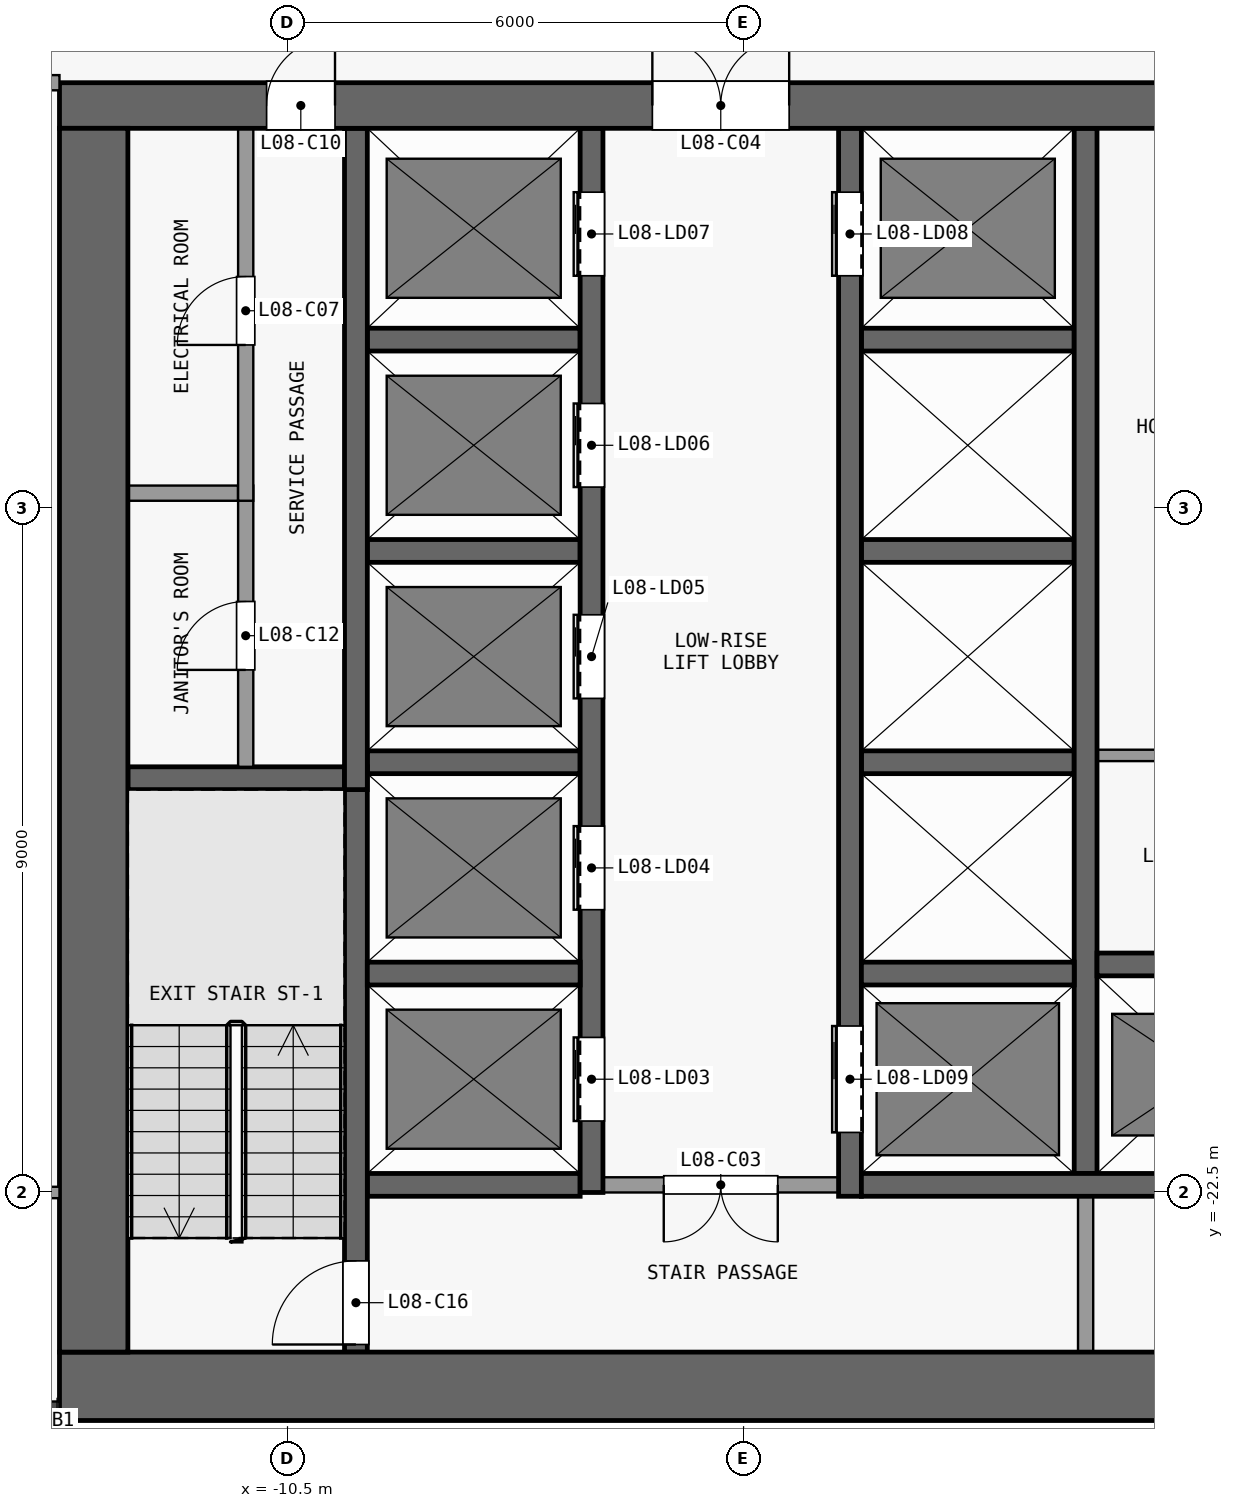
"""IFC4 building model, lengths in metres.
Left out: names, types, materials, properties, quantities, classifications, styles, units other than length and angle.
Written with IfcOpenShell. Run it as: python <this file> out.ifc"""

import sys

from ifc_helpers import new_model, si_unit, direction, frame, frame_2d, origin, place, context, subcontext, project, spatial, rectangle, extrude, element, fill, save


model = new_model("IFC4")
c1 = context("Model", 3, precision=1e-05, world=origin(), true_north=direction((0.0, 1.0)))
c2 = subcontext(c1, "Body", "Model", "MODEL_VIEW")
j1 = project(units=[si_unit("LENGTHUNIT", "METRE"), si_unit("PLANEANGLEUNIT", "RADIAN")], contexts=[c1])
p1 = place(None, origin())
s1 = spatial("IfcSite", under=j1, at=p1, CompositionType="ELEMENT")
p2 = place(p1, origin())
s2 = spatial("IfcBuilding", under=s1, at=p2, CompositionType="ELEMENT")
p3 = place(p2, frame((0.0, 0.0, 39.7)))
s3 = spatial("IfcBuildingStorey", under=s2, at=p3, CompositionType="ELEMENT", Elevation=39.7)
p4 = place(p3, frame((-13.5, -25.05, 0.0), z_axis=(0.0, 0.0, 1.0), x_axis=(1.0, 0.0, 0.0)))
e1 = element("IfcWall", 1, at=p4, inside=s3, PredefinedType="SHEAR", context=c2, shape_type="SweptSolid", body=[
    extrude(rectangle(XDim=27.0, YDim=0.9, at=frame_2d((13.5, 0.0))), origin(), (0.0, 0.0, 1.0), 3.3),
])
p5 = place(p3, frame((-13.5, -8.2, 0.0), z_axis=(0.0, 0.0, 1.0), x_axis=(1.0, 0.0, 0.0)))
e2 = element("IfcWall", 2, at=p5, inside=s3, PredefinedType="SHEAR", context=c2, shape_type="SweptSolid", body=[
    extrude(rectangle(XDim=27.0, YDim=0.6, at=frame_2d((13.5, 0.0))), origin(), (0.0, 0.0, 1.0), 3.3),
])
p6 = place(p5, frame((7.8, 0.0, 0.0)))
e3 = element("IfcOpeningElement", 3, at=p6, cuts=e2, PredefinedType="OPENING", context=c2, shape_type="SweptSolid", body=[
    extrude(rectangle(XDim=1.8, YDim=2.1, at=frame_2d((0.9, 1.05))), frame((0.0, 0.31, 0.0), z_axis=(0.0, -1.0, 0.0), x_axis=(1.0, 0.0, 0.0)), (0.0, 0.0, 1.0), 0.62),
])
p7 = place(p5, frame((17.4, 0.0, 0.0)))
e4 = element("IfcOpeningElement", 4, at=p7, cuts=e2, PredefinedType="OPENING", context=c2, shape_type="SweptSolid", body=[
    extrude(rectangle(XDim=1.8, YDim=2.1, at=frame_2d((0.9, 1.05))), frame((0.0, 0.31, 0.0), z_axis=(0.0, -1.0, 0.0), x_axis=(1.0, 0.0, 0.0)), (0.0, 0.0, 1.0), 0.62),
])
p8 = place(p5, frame((2.725, 0.0, 0.0)))
e5 = element("IfcOpeningElement", 5, at=p8, cuts=e2, PredefinedType="OPENING", context=c2, shape_type="SweptSolid", body=[
    extrude(rectangle(XDim=0.9, YDim=2.1, at=frame_2d((0.45, 1.05))), frame((0.0, 0.31, 0.0), z_axis=(0.0, -1.0, 0.0), x_axis=(1.0, 0.0, 0.0)), (0.0, 0.0, 1.0), 0.62),
])
p9 = place(p5, frame((23.375, 0.0, 0.0)))
e6 = element("IfcOpeningElement", 6, at=p9, cuts=e2, PredefinedType="OPENING", context=c2, shape_type="SweptSolid", body=[
    extrude(rectangle(XDim=0.9, YDim=2.1, at=frame_2d((0.45, 1.05))), frame((0.0, 0.31, 0.0), z_axis=(0.0, -1.0, 0.0), x_axis=(1.0, 0.0, 0.0)), (0.0, 0.0, 1.0), 0.62),
])
p10 = place(p3, frame((-13.05, -24.6, 0.0), z_axis=(0.0, 0.0, 1.0), x_axis=(0.0, 1.0, 0.0)))
e7 = element("IfcWall", 7, at=p10, inside=s3, PredefinedType="SHEAR", context=c2, shape_type="SweptSolid", body=[
    extrude(rectangle(XDim=16.1, YDim=0.9, at=frame_2d((8.05, 0.0))), origin(), (0.0, 0.0, 1.0), 3.3),
])
p11 = place(p3, frame((-9.45, -22.4, 0.0), z_axis=(0.0, 0.0, 1.0), x_axis=(1.0, 0.0, 0.0)))
e8 = element("IfcWall", 8, at=p11, inside=s3, PredefinedType="SHEAR", context=c2, shape_type="SweptSolid", body=[
    extrude(rectangle(XDim=2.8, YDim=0.3, at=frame_2d((1.4, 0.0))), origin(), (0.0, 0.0, 1.0), 3.3),
])
p12 = place(p3, frame((-3.25, -22.4, 0.0), z_axis=(0.0, 0.0, 1.0), x_axis=(-1.0, 0.0, 0.0)))
e9 = element("IfcWall", 9, at=p12, inside=s3, PredefinedType="PARTITIONING", context=c2, shape_type="SweptSolid", body=[
    extrude(rectangle(XDim=3.1, YDim=0.2, at=frame_2d((1.55, 0.0))), origin(), (0.0, 0.0, 1.0), 3.3),
])
p13 = place(p12, frame((0.8, 0.0, 0.0)))
e10 = element("IfcOpeningElement", 10, at=p13, cuts=e9, PredefinedType="OPENING", context=c2, shape_type="SweptSolid", body=[
    extrude(rectangle(XDim=1.5, YDim=2.1, at=frame_2d((0.75, 1.05))), frame((0.0, 0.11, 0.0), z_axis=(0.0, -1.0, 0.0), x_axis=(1.0, 0.0, 0.0)), (0.0, 0.0, 1.0), 0.22),
])
p14 = place(p3, frame((-2.95, -22.4, 0.0), z_axis=(0.0, 0.0, 1.0), x_axis=(1.0, 0.0, 0.0)))
e11 = element("IfcWall", 11, at=p14, inside=s3, PredefinedType="SHEAR", context=c2, shape_type="SweptSolid", body=[
    extrude(rectangle(XDim=6.2, YDim=0.3, at=frame_2d((3.1, 0.0))), origin(), (0.0, 0.0, 1.0), 3.3),
])
for number, where, z_axis, x_axis in (
    (12, (-9.45, -19.62, 0.0), (0.0, 0.0, 1.0), (1.0, 0.0, 0.0)),
    (13, (-2.95, -19.62, 0.0), (0.0, 0.0, 1.0), (1.0, 0.0, 0.0)),
):
    element("IfcWall", number, at=place(p3, frame(where, z_axis=z_axis, x_axis=x_axis)), inside=s3, PredefinedType="SHEAR", context=c2, shape_type="SweptSolid", body=[
        extrude(rectangle(XDim=2.8, YDim=0.3, at=frame_2d((1.4, 0.0))), origin(), (0.0, 0.0, 1.0), 3.3),
    ])
p15 = place(p3, frame((0.15, -19.5, 0.0), z_axis=(0.0, 0.0, 1.0), x_axis=(1.0, 0.0, 0.0)))
e14 = element("IfcWall", 14, at=p15, inside=s3, PredefinedType="SHEAR", context=c2, shape_type="SweptSolid", body=[
    extrude(rectangle(XDim=3.025, YDim=0.3, at=frame_2d((1.513, 0.0))), origin(), (0.0, 0.0, 1.0), 3.3),
])
p16 = place(p3, frame((-12.6, -17.05, 0.0), z_axis=(0.0, 0.0, 1.0), x_axis=(1.0, 0.0, 0.0)))
e15 = element("IfcWall", 15, at=p16, inside=s3, PredefinedType="SHEAR", context=c2, shape_type="SweptSolid", body=[
    extrude(rectangle(XDim=2.85, YDim=0.3, at=frame_2d((1.425, 0.0))), origin(), (0.0, 0.0, 1.0), 3.3),
])
for number, where, z_axis, x_axis in (
    (16, (-9.45, -16.84, 0.0), (0.0, 0.0, 1.0), (1.0, 0.0, 0.0)),
    (17, (-2.95, -16.84, 0.0), (0.0, 0.0, 1.0), (1.0, 0.0, 0.0)),
):
    element("IfcWall", number, at=place(p3, frame(where, z_axis=z_axis, x_axis=x_axis)), inside=s3, PredefinedType="SHEAR", context=c2, shape_type="SweptSolid", body=[
        extrude(rectangle(XDim=2.8, YDim=0.3, at=frame_2d((1.4, 0.0))), origin(), (0.0, 0.0, 1.0), 3.3),
    ])
p17 = place(p3, frame((0.15, -16.75, 0.0), z_axis=(0.0, 0.0, 1.0), x_axis=(1.0, 0.0, 0.0)))
e18 = element("IfcWall", 18, at=p17, inside=s3, PredefinedType="PARTITIONING", context=c2, shape_type="SweptSolid", body=[
    extrude(rectangle(XDim=2.875, YDim=0.15, at=frame_2d((1.438, 0.0))), origin(), (0.0, 0.0, 1.0), 3.3),
])
for number, where, z_axis, x_axis in (
    (19, (-9.45, -14.06, 0.0), (0.0, 0.0, 1.0), (1.0, 0.0, 0.0)),
    (20, (-2.95, -14.06, 0.0), (0.0, 0.0, 1.0), (1.0, 0.0, 0.0)),
):
    element("IfcWall", number, at=place(p3, frame(where, z_axis=z_axis, x_axis=x_axis)), inside=s3, PredefinedType="SHEAR", context=c2, shape_type="SweptSolid", body=[
        extrude(rectangle(XDim=2.8, YDim=0.3, at=frame_2d((1.4, 0.0))), origin(), (0.0, 0.0, 1.0), 3.3),
    ])
p18 = place(p3, frame((-12.6, -13.3, 0.0), z_axis=(0.0, 0.0, 1.0), x_axis=(1.0, 0.0, 0.0)))
e21 = element("IfcWall", 21, at=p18, inside=s3, PredefinedType="PARTITIONING", context=c2, shape_type="SweptSolid", body=[
    extrude(rectangle(XDim=1.45, YDim=0.2, at=frame_2d((0.725, 0.0))), origin(), (0.0, 0.0, 1.0), 3.3),
])
for number, where, z_axis, x_axis in (
    (22, (-9.45, -11.28, 0.0), (0.0, 0.0, 1.0), (1.0, 0.0, 0.0)),
    (23, (-2.95, -11.28, 0.0), (0.0, 0.0, 1.0), (1.0, 0.0, 0.0)),
):
    element("IfcWall", number, at=place(p3, frame(where, z_axis=z_axis, x_axis=x_axis)), inside=s3, PredefinedType="SHEAR", context=c2, shape_type="SweptSolid", body=[
        extrude(rectangle(XDim=2.8, YDim=0.3, at=frame_2d((1.4, 0.0))), origin(), (0.0, 0.0, 1.0), 3.3),
    ])
p19 = place(p3, frame((-11.05, -16.9, 0.0), z_axis=(0.0, 0.0, 1.0), x_axis=(0.0, 1.0, 0.0)))
e24 = element("IfcWall", 24, at=p19, inside=s3, PredefinedType="PARTITIONING", context=c2, shape_type="SweptSolid", body=[
    extrude(rectangle(XDim=3.7, YDim=0.2, at=frame_2d((1.85, 0.0))), origin(), (0.0, 0.0, 1.0), 3.3),
])
p20 = place(p19, frame((1.275, 0.0, 0.0)))
e25 = element("IfcOpeningElement", 25, at=p20, cuts=e24, PredefinedType="OPENING", context=c2, shape_type="SweptSolid", body=[
    extrude(rectangle(XDim=0.9, YDim=2.1, at=frame_2d((0.45, 1.05))), frame((0.0, 0.11, 0.0), z_axis=(0.0, -1.0, 0.0), x_axis=(1.0, 0.0, 0.0)), (0.0, 0.0, 1.0), 0.22),
])
p21 = place(p3, frame((-11.05, -13.4, 0.0), z_axis=(0.0, 0.0, 1.0), x_axis=(0.0, 1.0, 0.0)))
e26 = element("IfcWall", 26, at=p21, inside=s3, PredefinedType="PARTITIONING", context=c2, shape_type="SweptSolid", body=[
    extrude(rectangle(XDim=4.9, YDim=0.2, at=frame_2d((2.45, 0.0))), origin(), (0.0, 0.0, 1.0), 3.3),
])
p22 = place(p21, frame((2.05, 0.0, 0.0)))
e27 = element("IfcOpeningElement", 27, at=p22, cuts=e26, PredefinedType="OPENING", context=c2, shape_type="SweptSolid", body=[
    extrude(rectangle(XDim=0.9, YDim=2.1, at=frame_2d((0.45, 1.05))), frame((0.0, 0.11, 0.0), z_axis=(0.0, -1.0, 0.0), x_axis=(1.0, 0.0, 0.0)), (0.0, 0.0, 1.0), 0.22),
])
p23 = place(p3, frame((-9.6, -24.6, 0.0), z_axis=(0.0, 0.0, 1.0), x_axis=(0.0, 1.0, 0.0)))
e28 = element("IfcWall", 28, at=p23, inside=s3, PredefinedType="SHEAR", context=c2, shape_type="SweptSolid", body=[
    extrude(rectangle(XDim=7.7, YDim=0.3, at=frame_2d((3.85, 0.0))), origin(), (0.0, 0.0, 1.0), 3.3),
])
p24 = place(p23, frame((0.1, 0.0, 0.0)))
e29 = element("IfcOpeningElement", 29, at=p24, cuts=e28, PredefinedType="OPENING", context=c2, shape_type="SweptSolid", body=[
    extrude(rectangle(XDim=1.1, YDim=2.1, at=frame_2d((0.55, 1.05))), frame((0.0, 0.16, 0.0), z_axis=(0.0, -1.0, 0.0), x_axis=(1.0, 0.0, 0.0)), (0.0, 0.0, 1.0), 0.32),
])
p25 = place(p3, frame((-9.6, -17.2, 0.0), z_axis=(0.0, 0.0, 1.0), x_axis=(0.0, 1.0, 0.0)))
e30 = element("IfcWall", 30, at=p25, inside=s3, PredefinedType="SHEAR", context=c2, shape_type="SweptSolid", body=[
    extrude(rectangle(XDim=8.7, YDim=0.3, at=frame_2d((4.35, 0.0))), origin(), (0.0, 0.0, 1.0), 3.3),
])
p26 = place(p3, frame((-6.5, -22.5, 0.0), z_axis=(0.0, 0.0, 1.0), x_axis=(0.0, 1.0, 0.0)))
e31 = element("IfcWall", 31, at=p26, inside=s3, PredefinedType="SHEAR", context=c2, shape_type="SweptSolid", body=[
    extrude(rectangle(XDim=14.0, YDim=0.3, at=frame_2d((7.0, 0.0))), origin(), (0.0, 0.0, 1.0), 3.3),
])
p27 = place(p26, frame((0.94, 0.0, 0.0)))
e32 = element("IfcOpeningElement", 32, at=p27, cuts=e31, PredefinedType="OPENING", context=c2, shape_type="SweptSolid", body=[
    extrude(rectangle(XDim=1.1, YDim=2.1, at=frame_2d((0.55, 1.05))), frame((0.0, 0.16, 0.0), z_axis=(0.0, -1.0, 0.0), x_axis=(1.0, 0.0, 0.0)), (0.0, 0.0, 1.0), 0.32),
])
p28 = place(p26, frame((3.72, 0.0, 0.0)))
e33 = element("IfcOpeningElement", 33, at=p28, cuts=e31, PredefinedType="OPENING", context=c2, shape_type="SweptSolid", body=[
    extrude(rectangle(XDim=1.1, YDim=2.1, at=frame_2d((0.55, 1.05))), frame((0.0, 0.16, 0.0), z_axis=(0.0, -1.0, 0.0), x_axis=(1.0, 0.0, 0.0)), (0.0, 0.0, 1.0), 0.32),
])
p29 = place(p26, frame((6.5, 0.0, 0.0)))
e34 = element("IfcOpeningElement", 34, at=p29, cuts=e31, PredefinedType="OPENING", context=c2, shape_type="SweptSolid", body=[
    extrude(rectangle(XDim=1.1, YDim=2.1, at=frame_2d((0.55, 1.05))), frame((0.0, 0.16, 0.0), z_axis=(0.0, -1.0, 0.0), x_axis=(1.0, 0.0, 0.0)), (0.0, 0.0, 1.0), 0.32),
])
p30 = place(p26, frame((9.28, 0.0, 0.0)))
e35 = element("IfcOpeningElement", 35, at=p30, cuts=e31, PredefinedType="OPENING", context=c2, shape_type="SweptSolid", body=[
    extrude(rectangle(XDim=1.1, YDim=2.1, at=frame_2d((0.55, 1.05))), frame((0.0, 0.16, 0.0), z_axis=(0.0, -1.0, 0.0), x_axis=(1.0, 0.0, 0.0)), (0.0, 0.0, 1.0), 0.32),
])
p31 = place(p26, frame((12.06, 0.0, 0.0)))
e36 = element("IfcOpeningElement", 36, at=p31, cuts=e31, PredefinedType="OPENING", context=c2, shape_type="SweptSolid", body=[
    extrude(rectangle(XDim=1.1, YDim=2.1, at=frame_2d((0.55, 1.05))), frame((0.0, 0.16, 0.0), z_axis=(0.0, -1.0, 0.0), x_axis=(1.0, 0.0, 0.0)), (0.0, 0.0, 1.0), 0.32),
])
p32 = place(p3, frame((-3.1, -22.55, 0.0), z_axis=(0.0, 0.0, 1.0), x_axis=(0.0, 1.0, 0.0)))
e37 = element("IfcWall", 37, at=p32, inside=s3, PredefinedType="SHEAR", context=c2, shape_type="SweptSolid", body=[
    extrude(rectangle(XDim=14.05, YDim=0.3, at=frame_2d((7.025, 0.0))), origin(), (0.0, 0.0, 1.0), 3.3),
])
p33 = place(p32, frame((12.11, 0.0, 0.0)))
e38 = element("IfcOpeningElement", 38, at=p33, cuts=e37, PredefinedType="OPENING", context=c2, shape_type="SweptSolid", body=[
    extrude(rectangle(XDim=1.1, YDim=2.1, at=frame_2d((0.55, 1.05))), frame((0.0, 0.16, 0.0), z_axis=(0.0, -1.0, 0.0), x_axis=(1.0, 0.0, 0.0)), (0.0, 0.0, 1.0), 0.32),
])
p34 = place(p32, frame((0.84, 0.0, 0.0)))
e39 = element("IfcOpeningElement", 39, at=p34, cuts=e37, PredefinedType="OPENING", context=c2, shape_type="SweptSolid", body=[
    extrude(rectangle(XDim=1.4, YDim=2.1, at=frame_2d((0.7, 1.05))), frame((0.0, 0.16, 0.0), z_axis=(0.0, -1.0, 0.0), x_axis=(1.0, 0.0, 0.0)), (0.0, 0.0, 1.0), 0.32),
])
p35 = place(p3, frame((0.0, -24.6, 0.0), z_axis=(0.0, 0.0, 1.0), x_axis=(0.0, 1.0, 0.0)))
e40 = element("IfcWall", 40, at=p35, inside=s3, PredefinedType="PARTITIONING", context=c2, shape_type="SweptSolid", body=[
    extrude(rectangle(XDim=2.05, YDim=0.2, at=frame_2d((1.025, 0.0))), origin(), (0.0, 0.0, 1.0), 3.3),
])
p36 = place(p3, frame((0.0, -22.25, 0.0), z_axis=(0.0, 0.0, 1.0), x_axis=(0.0, 1.0, 0.0)))
e41 = element("IfcWall", 41, at=p36, inside=s3, PredefinedType="SHEAR", context=c2, shape_type="SweptSolid", body=[
    extrude(rectangle(XDim=13.75, YDim=0.3, at=frame_2d((6.875, 0.0))), origin(), (0.0, 0.0, 1.0), 3.3),
])
p37 = place(p3, frame((-16.425, -22.5, 0.0), z_axis=(0.0, 0.0, 1.0), x_axis=(1.0, 0.0, 0.0)))
e42 = element("IfcWall", 42, at=p37, inside=s3, PredefinedType="PARTITIONING", context=c2, shape_type="SweptSolid", body=[
    extrude(rectangle(XDim=2.925, YDim=0.15, at=frame_2d((1.462, 0.0))), origin(), (0.0, 0.0, 1.0), 3.3),
])
p38 = place(p37, frame((1.0, 0.0, 0.0)))
e43 = element("IfcOpeningElement", 43, at=p38, cuts=e42, PredefinedType="OPENING", context=c2, shape_type="SweptSolid", body=[
    extrude(rectangle(XDim=0.9, YDim=2.1, at=frame_2d((0.45, 1.05))), frame((0.0, 0.085, 0.0), z_axis=(0.0, -1.0, 0.0), x_axis=(1.0, 0.0, 0.0)), (0.0, 0.0, 1.0), 0.17),
])
p39 = place(p3, frame((-26.15, -7.9, 0.0), z_axis=(0.0, 0.0, 1.0), x_axis=(1.0, 0.0, 0.0)))
e44 = element("IfcWall", 44, at=p39, inside=s3, PredefinedType="PARTITIONING", context=c2, shape_type="SweptSolid", body=[
    extrude(rectangle(XDim=12.65, YDim=0.2, at=frame_2d((6.325, 0.0))), origin(), (0.0, 0.0, 1.0), 3.3),
])
p40 = place(p39, frame((10.65, 0.0, 0.0)))
e45 = element("IfcOpeningElement", 45, at=p40, cuts=e44, PredefinedType="OPENING", context=c2, shape_type="SweptSolid", body=[
    extrude(rectangle(XDim=1.0, YDim=2.1, at=frame_2d((0.5, 1.05))), frame((0.0, 0.11, 0.0), z_axis=(0.0, -1.0, 0.0), x_axis=(1.0, 0.0, 0.0)), (0.0, 0.0, 1.0), 0.22),
])
p41 = place(p27, origin())
e46 = element("IfcDoor", 46, at=p41, inside=s3, OperationType="DOUBLE_DOOR_SLIDING", PredefinedType="DOOR", context=c2, shape_type="SweptSolid", body=[
    extrude(rectangle(XDim=1.1, YDim=2.1, at=frame_2d((0.55, 1.05))), frame((0.0, 0.025, 0.0), z_axis=(0.0, -1.0, 0.0), x_axis=(1.0, 0.0, 0.0)), (0.0, 0.0, 1.0), 0.05),
])
fill(e32, e46)
p42 = place(p28, origin())
e47 = element("IfcDoor", 47, at=p42, inside=s3, OperationType="DOUBLE_DOOR_SLIDING", PredefinedType="DOOR", context=c2, shape_type="SweptSolid", body=[
    extrude(rectangle(XDim=1.1, YDim=2.1, at=frame_2d((0.55, 1.05))), frame((0.0, 0.025, 0.0), z_axis=(0.0, -1.0, 0.0), x_axis=(1.0, 0.0, 0.0)), (0.0, 0.0, 1.0), 0.05),
])
fill(e33, e47)
p43 = place(p29, origin())
e48 = element("IfcDoor", 48, at=p43, inside=s3, OperationType="DOUBLE_DOOR_SLIDING", PredefinedType="DOOR", context=c2, shape_type="SweptSolid", body=[
    extrude(rectangle(XDim=1.1, YDim=2.1, at=frame_2d((0.55, 1.05))), frame((0.0, 0.025, 0.0), z_axis=(0.0, -1.0, 0.0), x_axis=(1.0, 0.0, 0.0)), (0.0, 0.0, 1.0), 0.05),
])
fill(e34, e48)
p44 = place(p30, origin())
e49 = element("IfcDoor", 49, at=p44, inside=s3, OperationType="DOUBLE_DOOR_SLIDING", PredefinedType="DOOR", context=c2, shape_type="SweptSolid", body=[
    extrude(rectangle(XDim=1.1, YDim=2.1, at=frame_2d((0.55, 1.05))), frame((0.0, 0.025, 0.0), z_axis=(0.0, -1.0, 0.0), x_axis=(1.0, 0.0, 0.0)), (0.0, 0.0, 1.0), 0.05),
])
fill(e35, e49)
p45 = place(p31, origin())
e50 = element("IfcDoor", 50, at=p45, inside=s3, OperationType="DOUBLE_DOOR_SLIDING", PredefinedType="DOOR", context=c2, shape_type="SweptSolid", body=[
    extrude(rectangle(XDim=1.1, YDim=2.1, at=frame_2d((0.55, 1.05))), frame((0.0, 0.025, 0.0), z_axis=(0.0, -1.0, 0.0), x_axis=(1.0, 0.0, 0.0)), (0.0, 0.0, 1.0), 0.05),
])
fill(e36, e50)
p46 = place(p33, origin())
e51 = element("IfcDoor", 51, at=p46, inside=s3, OperationType="DOUBLE_DOOR_SLIDING", PredefinedType="DOOR", context=c2, shape_type="SweptSolid", body=[
    extrude(rectangle(XDim=1.1, YDim=2.1, at=frame_2d((0.55, 1.05))), frame((0.0, 0.025, 0.0), z_axis=(0.0, -1.0, 0.0), x_axis=(1.0, 0.0, 0.0)), (0.0, 0.0, 1.0), 0.05),
])
fill(e38, e51)
p47 = place(p34, origin())
e52 = element("IfcDoor", 52, at=p47, inside=s3, OperationType="DOUBLE_DOOR_SLIDING", PredefinedType="DOOR", context=c2, shape_type="SweptSolid", body=[
    extrude(rectangle(XDim=1.4, YDim=2.1, at=frame_2d((0.7, 1.05))), frame((0.0, 0.025, 0.0), z_axis=(0.0, -1.0, 0.0), x_axis=(1.0, 0.0, 0.0)), (0.0, 0.0, 1.0), 0.05),
])
fill(e39, e52)
p48 = place(p13, origin())
e53 = element("IfcDoor", 53, at=p48, inside=s3, OperationType="DOUBLE_DOOR_SINGLE_SWING", PredefinedType="DOOR", context=c2, shape_type="SweptSolid", body=[
    extrude(rectangle(XDim=1.5, YDim=2.1, at=frame_2d((0.75, 1.05))), frame((0.0, 0.025, 0.0), z_axis=(0.0, -1.0, 0.0), x_axis=(1.0, 0.0, 0.0)), (0.0, 0.0, 1.0), 0.05),
])
fill(e10, e53)
p49 = place(p6, origin())
e54 = element("IfcDoor", 54, at=p49, inside=s3, OperationType="DOUBLE_DOOR_SINGLE_SWING", PredefinedType="DOOR", context=c2, shape_type="SweptSolid", body=[
    extrude(rectangle(XDim=1.8, YDim=2.1, at=frame_2d((0.9, 1.05))), frame((0.0, 0.025, 0.0), z_axis=(0.0, -1.0, 0.0), x_axis=(1.0, 0.0, 0.0)), (0.0, 0.0, 1.0), 0.05),
])
fill(e3, e54)
p50 = place(p22, origin())
e55 = element("IfcDoor", 55, at=p50, inside=s3, OperationType="SINGLE_SWING_LEFT", PredefinedType="DOOR", context=c2, shape_type="SweptSolid", body=[
    extrude(rectangle(XDim=0.9, YDim=2.1, at=frame_2d((0.45, 1.05))), frame((0.0, 0.025, 0.0), z_axis=(0.0, -1.0, 0.0), x_axis=(1.0, 0.0, 0.0)), (0.0, 0.0, 1.0), 0.05),
])
fill(e27, e55)
p51 = place(p8, origin())
e56 = element("IfcDoor", 56, at=p51, inside=s3, OperationType="SINGLE_SWING_RIGHT", PredefinedType="DOOR", context=c2, shape_type="SweptSolid", body=[
    extrude(rectangle(XDim=0.9, YDim=2.1, at=frame_2d((0.45, 1.05))), frame((0.0, 0.025, 0.0), z_axis=(0.0, -1.0, 0.0), x_axis=(1.0, 0.0, 0.0)), (0.0, 0.0, 1.0), 0.05),
])
fill(e5, e56)
p52 = place(p20, origin())
e57 = element("IfcDoor", 57, at=p52, inside=s3, OperationType="SINGLE_SWING_LEFT", PredefinedType="DOOR", context=c2, shape_type="SweptSolid", body=[
    extrude(rectangle(XDim=0.9, YDim=2.1, at=frame_2d((0.45, 1.05))), frame((0.0, 0.025, 0.0), z_axis=(0.0, -1.0, 0.0), x_axis=(1.0, 0.0, 0.0)), (0.0, 0.0, 1.0), 0.05),
])
fill(e25, e57)
p53 = place(p24, origin())
e58 = element("IfcDoor", 58, at=p53, inside=s3, OperationType="SINGLE_SWING_LEFT", PredefinedType="DOOR", context=c2, shape_type="SweptSolid", body=[
    extrude(rectangle(XDim=1.1, YDim=2.1, at=frame_2d((0.55, 1.05))), frame((0.0, 0.025, 0.0), z_axis=(0.0, -1.0, 0.0), x_axis=(1.0, 0.0, 0.0)), (0.0, 0.0, 1.0), 0.05),
])
fill(e29, e58)
save(model, sys.argv[1])
